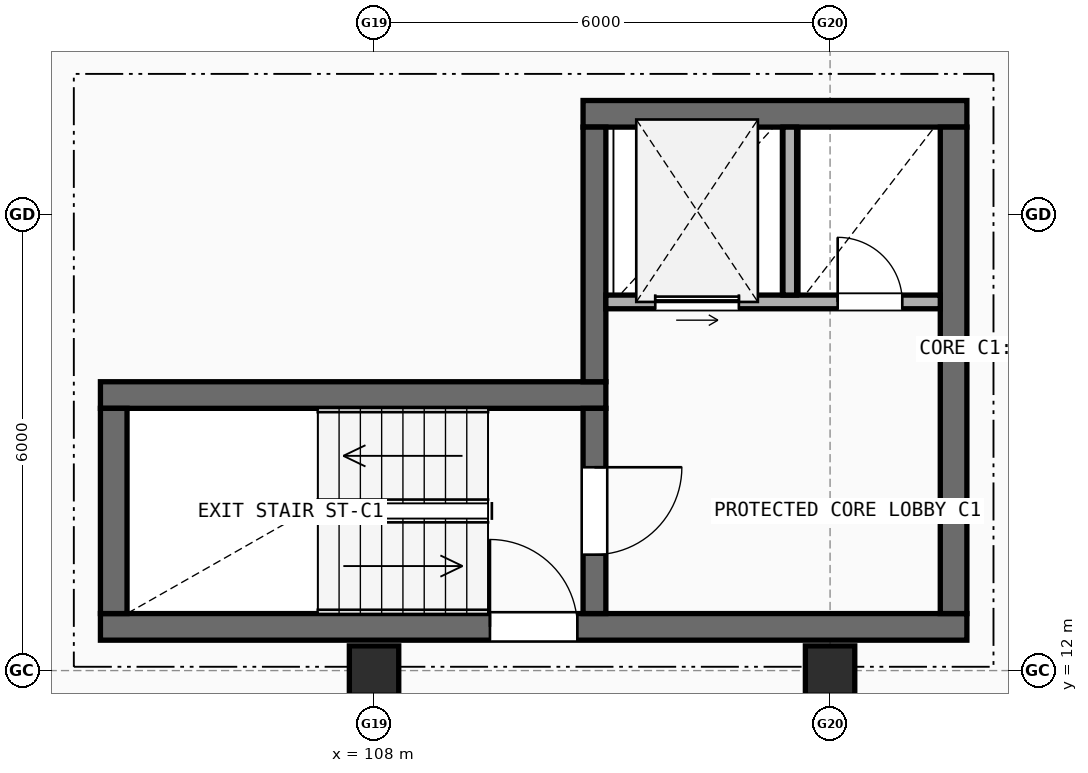
"""IFC4 building model, lengths in metres.
Left out: names, types, materials, properties, quantities, classifications, styles, units other than length and angle.
Written with IfcOpenShell. Run it as: python <this file> out.ifc"""

import sys

from ifc_helpers import new_model, si_unit, direction, frame, frame_2d, origin, origin_2d, place, context, subcontext, project, spatial, rectangle, extrude, element, fill, save


model = new_model("IFC4")
c1 = context("Model", 3, precision=1e-05, world=origin(), true_north=direction((0.0, 1.0)))
c2 = subcontext(c1, "Body", "Model", "MODEL_VIEW")
j1 = project(units=[si_unit("LENGTHUNIT", "METRE"), si_unit("PLANEANGLEUNIT", "RADIAN")], contexts=[c1])
p1 = place(None, origin())
s1 = spatial("IfcSite", under=j1, at=p1, CompositionType="ELEMENT")
p2 = place(p1, origin())
s2 = spatial("IfcBuilding", under=s1, at=p2, CompositionType="ELEMENT")
p3 = place(p2, frame((0.0, 0.0, 10.9)))
s3 = spatial("IfcBuildingStorey", under=s2, at=p3, CompositionType="ELEMENT", Elevation=10.9)
for number, where, z_axis, x_axis in (
    (1, (108.0, 12.0, 0.0), (0.0, 0.0, 1.0), (1.0, 0.0, 0.0)),
    (2, (114.0, 12.0, 0.0), (0.0, 0.0, 1.0), (1.0, 0.0, 0.0)),
):
    element("IfcColumn", number, at=place(p3, frame(where, z_axis=z_axis, x_axis=x_axis)), inside=s3, PredefinedType="COLUMN", context=c2, shape_type="SweptSolid", body=[
        extrude(rectangle(XDim=0.65, YDim=0.65, at=origin_2d()), origin(), (0.0, 0.0, 1.0), 2.96),
    ])
p4 = place(p3, frame((104.4, 12.575, 0.0), z_axis=(0.0, 0.0, 1.0), x_axis=(1.0, 0.0, 0.0)))
e3 = element("IfcWall", 3, at=p4, inside=s3, PredefinedType="SHEAR", context=c2, shape_type="SweptSolid", body=[
    extrude(rectangle(XDim=11.4, YDim=0.35, at=frame_2d((5.7, 0.0))), origin(), (0.0, 0.0, 1.0), 2.96),
])
p5 = place(p4, frame((5.125, 0.0, 0.0)))
e4 = element("IfcOpeningElement", 4, at=p5, cuts=e3, PredefinedType="OPENING", context=c2, shape_type="SweptSolid", body=[
    extrude(rectangle(XDim=1.15, YDim=2.15, at=frame_2d((0.575, 1.075))), frame((0.0, 0.185, 0.0), z_axis=(0.0, -1.0, 0.0), x_axis=(1.0, 0.0, 0.0)), (0.0, 0.0, 1.0), 0.37),
])
p6 = place(p3, frame((111.05, 15.625, 0.0), z_axis=(0.0, 0.0, 1.0), x_axis=(-1.0, 0.0, 0.0)))
e5 = element("IfcWall", 5, at=p6, inside=s3, PredefinedType="SHEAR", context=c2, shape_type="SweptSolid", body=[
    extrude(rectangle(XDim=6.65, YDim=0.35, at=frame_2d((3.325, 0.0))), origin(), (0.0, 0.0, 1.0), 2.96),
])
p7 = place(p3, frame((104.575, 15.45, 0.0), z_axis=(0.0, 0.0, 1.0), x_axis=(0.0, -1.0, 0.0)))
e6 = element("IfcWall", 6, at=p7, inside=s3, PredefinedType="SHEAR", context=c2, shape_type="SweptSolid", body=[
    extrude(rectangle(XDim=2.7, YDim=0.35, at=frame_2d((1.35, 0.0))), origin(), (0.0, 0.0, 1.0), 2.96),
])
p8 = place(p3, frame((110.9, 12.75, 0.0), z_axis=(0.0, 0.0, 1.0), x_axis=(0.0, 1.0, 0.0)))
e7 = element("IfcWall", 7, at=p8, inside=s3, PredefinedType="SHEAR", context=c2, shape_type="SweptSolid", body=[
    extrude(rectangle(XDim=2.7, YDim=0.3, at=frame_2d((1.35, 0.0))), origin(), (0.0, 0.0, 1.0), 2.96),
])
p9 = place(p8, frame((0.775, 0.0, 0.0)))
e8 = element("IfcOpeningElement", 8, at=p9, cuts=e7, PredefinedType="OPENING", context=c2, shape_type="SweptSolid", body=[
    extrude(rectangle(XDim=1.15, YDim=2.15, at=frame_2d((0.575, 1.075))), frame((0.0, 0.16, 0.0), z_axis=(0.0, -1.0, 0.0), x_axis=(1.0, 0.0, 0.0)), (0.0, 0.0, 1.0), 0.32),
])
p10 = place(p3, frame((115.8, 19.325, 0.0), z_axis=(0.0, 0.0, 1.0), x_axis=(-1.0, 0.0, 0.0)))
e9 = element("IfcWall", 9, at=p10, inside=s3, PredefinedType="SHEAR", context=c2, shape_type="SweptSolid", body=[
    extrude(rectangle(XDim=5.05, YDim=0.35, at=frame_2d((2.525, 0.0))), origin(), (0.0, 0.0, 1.0), 2.96),
])
p11 = place(p3, frame((115.625, 12.75, 0.0), z_axis=(0.0, 0.0, 1.0), x_axis=(0.0, 1.0, 0.0)))
e10 = element("IfcWall", 10, at=p11, inside=s3, PredefinedType="SHEAR", context=c2, shape_type="SweptSolid", body=[
    extrude(rectangle(XDim=6.4, YDim=0.35, at=frame_2d((3.2, 0.0))), origin(), (0.0, 0.0, 1.0), 2.96),
])
p12 = place(p3, frame((110.9, 15.8, 0.0), z_axis=(0.0, 0.0, 1.0), x_axis=(0.0, 1.0, 0.0)))
e11 = element("IfcWall", 11, at=p12, inside=s3, PredefinedType="SHEAR", context=c2, shape_type="SweptSolid", body=[
    extrude(rectangle(XDim=3.35, YDim=0.3, at=frame_2d((1.675, 0.0))), origin(), (0.0, 0.0, 1.0), 2.96),
])
p13 = place(p3, frame((111.05, 16.85, 0.0), z_axis=(0.0, 0.0, 1.0), x_axis=(1.0, 0.0, 0.0)))
e12 = element("IfcWall", 12, at=p13, inside=s3, PredefinedType="SOLIDWALL", context=c2, shape_type="SweptSolid", body=[
    extrude(rectangle(XDim=4.4, YDim=0.18, at=frame_2d((2.2, 0.0))), origin(), (0.0, 0.0, 1.0), 2.96),
])
p14 = place(p13, frame((0.65, 0.0, 0.0)))
e13 = element("IfcOpeningElement", 13, at=p14, cuts=e12, PredefinedType="OPENING", context=c2, shape_type="SweptSolid", body=[
    extrude(rectangle(XDim=1.1, YDim=2.15, at=frame_2d((0.55, 1.075))), frame((0.0, 0.1, 0.0), z_axis=(0.0, -1.0, 0.0), x_axis=(1.0, 0.0, 0.0)), (0.0, 0.0, 1.0), 0.2),
])
p15 = place(p13, frame((3.05, 0.0, 0.0)))
e14 = element("IfcOpeningElement", 14, at=p15, cuts=e12, PredefinedType="OPENING", context=c2, shape_type="SweptSolid", body=[
    extrude(rectangle(XDim=0.85, YDim=2.1, at=frame_2d((0.425, 1.05))), frame((0.0, 0.1, 0.0), z_axis=(0.0, -1.0, 0.0), x_axis=(1.0, 0.0, 0.0)), (0.0, 0.0, 1.0), 0.2),
])
p16 = place(p3, frame((113.47, 16.94, 0.0), z_axis=(0.0, 0.0, 1.0), x_axis=(0.0, 1.0, 0.0)))
e15 = element("IfcWall", 15, at=p16, inside=s3, PredefinedType="SOLIDWALL", context=c2, shape_type="SweptSolid", body=[
    extrude(rectangle(XDim=2.21, YDim=0.18, at=frame_2d((1.105, 0.0))), origin(), (0.0, 0.0, 1.0), 2.96),
])
p17 = place(p5, origin())
e16 = element("IfcDoor", 16, at=p17, inside=s3, OperationType="SINGLE_SWING_LEFT", PredefinedType="DOOR", context=c2, shape_type="SweptSolid", body=[
    extrude(rectangle(XDim=1.15, YDim=2.15, at=frame_2d((0.575, 1.075))), frame((0.0, 0.025, 0.0), z_axis=(0.0, -1.0, 0.0), x_axis=(1.0, 0.0, 0.0)), (0.0, 0.0, 1.0), 0.05),
])
fill(e4, e16)
p18 = place(p9, origin())
e17 = element("IfcDoor", 17, at=p18, inside=s3, OperationType="SINGLE_SWING_RIGHT", PredefinedType="DOOR", context=c2, shape_type="SweptSolid", body=[
    extrude(rectangle(XDim=1.15, YDim=2.15, at=frame_2d((0.575, 1.075))), frame((0.0, 0.025, 0.0), z_axis=(0.0, -1.0, 0.0), x_axis=(1.0, 0.0, 0.0)), (0.0, 0.0, 1.0), 0.05),
])
fill(e8, e17)
p19 = place(p14, origin())
e18 = element("IfcDoor", 18, at=p19, inside=s3, OperationType="SLIDING_TO_LEFT", PredefinedType="DOOR", context=c2, shape_type="SweptSolid", body=[
    extrude(rectangle(XDim=1.1, YDim=2.15, at=frame_2d((0.55, 1.075))), frame((0.0, 0.025, 0.0), z_axis=(0.0, -1.0, 0.0), x_axis=(1.0, 0.0, 0.0)), (0.0, 0.0, 1.0), 0.05),
])
fill(e13, e18)
p20 = place(p15, frame((0.85, 0.0, 0.0), z_axis=(0.0, 0.0, 1.0), x_axis=(-1.0, 0.0, 0.0)))
e19 = element("IfcDoor", 19, at=p20, inside=s3, OperationType="SINGLE_SWING_LEFT", PredefinedType="DOOR", context=c2, shape_type="SweptSolid", body=[
    extrude(rectangle(XDim=0.85, YDim=2.1, at=frame_2d((0.425, 1.05))), frame((0.0, 0.025, 0.0), z_axis=(0.0, -1.0, 0.0), x_axis=(1.0, 0.0, 0.0)), (0.0, 0.0, 1.0), 0.05),
])
fill(e14, e19)
save(model, sys.argv[1])
